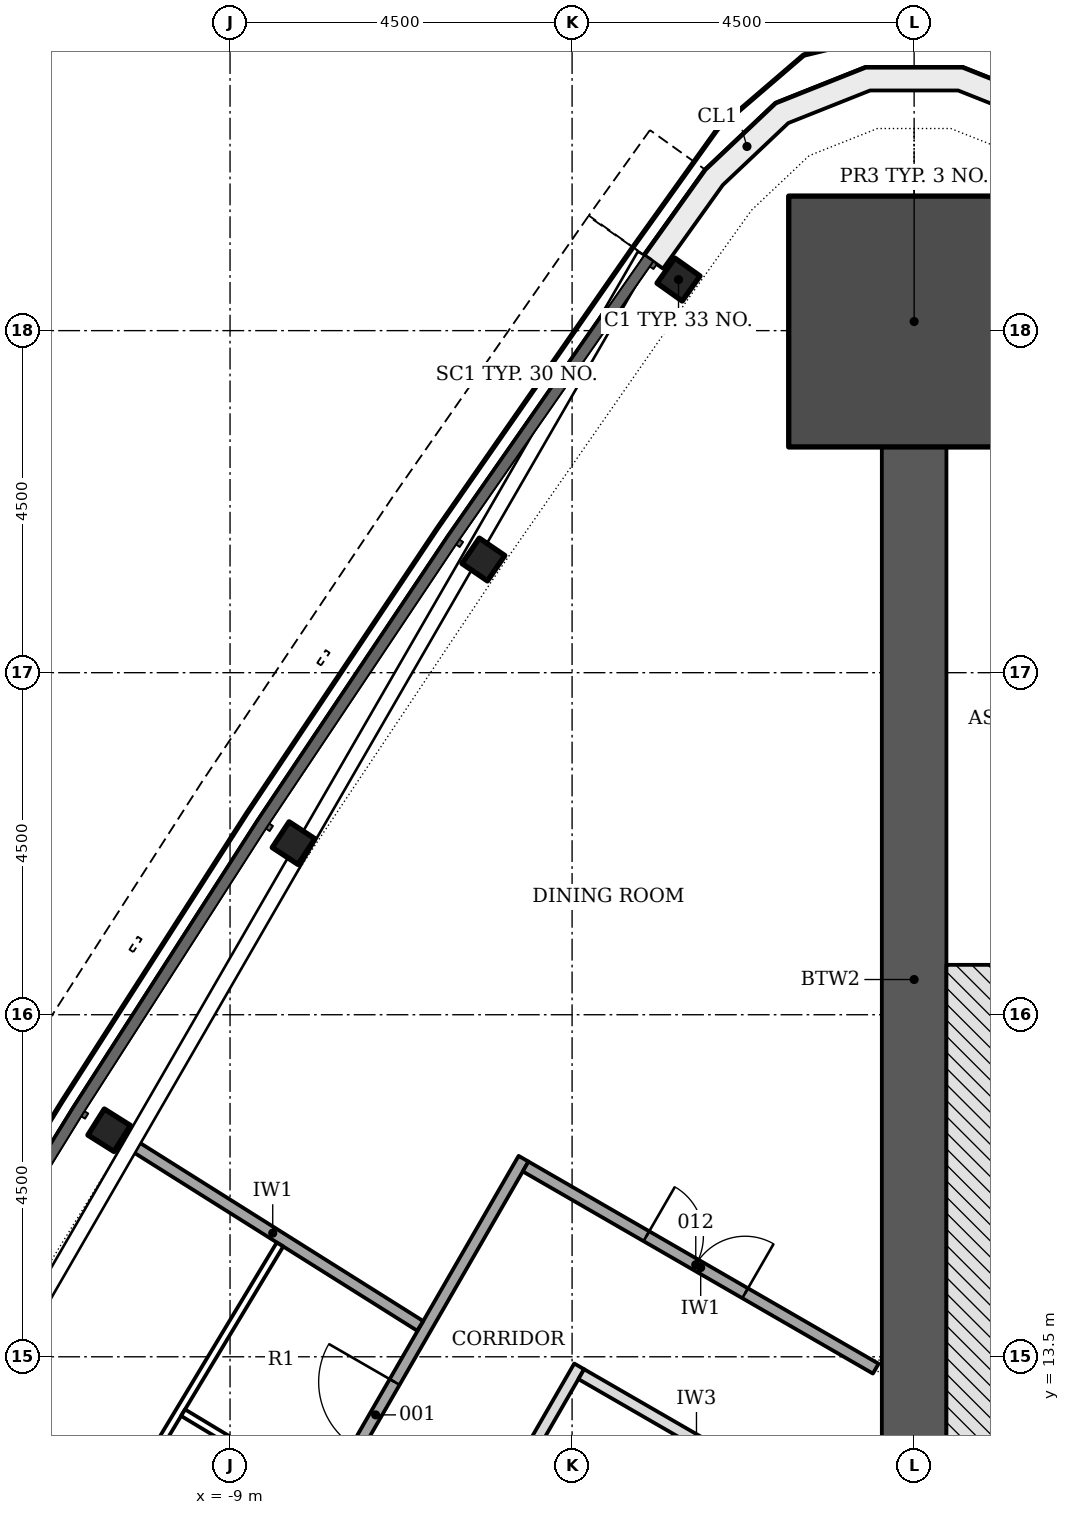
"""IFC4 building model, lengths in metres.
Left out: names, types, materials, properties, quantities, classifications, styles, units other than length and angle.
Written with IfcOpenShell. Run it as: python <this file> out.ifc"""

import sys

from ifc_helpers import new_model, si_unit, direction, frame, frame_2d, origin, origin_2d, place, context, subcontext, project, spatial, polyline, rectangle, i_section, outline, extrude, element, fill, save


model = new_model("IFC4")
c1 = context("Model", 3, precision=1e-05, world=origin(), true_north=direction((0.0, 1.0)))
c2 = subcontext(c1, "Body", "Model", "MODEL_VIEW")
j1 = project(units=[si_unit("LENGTHUNIT", "METRE"), si_unit("PLANEANGLEUNIT", "RADIAN")], contexts=[c1])
p1 = place(None, origin())
s1 = spatial("IfcSite", under=j1, at=p1, CompositionType="ELEMENT")
p2 = place(p1, origin())
s2 = spatial("IfcBuilding", under=s1, at=p2, CompositionType="ELEMENT")
p3 = place(p2, frame((0.0, 0.0, 45.6)))
s3 = spatial("IfcBuildingStorey", under=s2, at=p3, CompositionType="ELEMENT", Elevation=45.6)
p4 = place(p3, frame((0.0, 11.456, -0.2), z_axis=(0.0, 0.0, 1.0), x_axis=(0.0, 1.0, 0.0)))
e1 = element("IfcWall", 1, at=p4, inside=s3, PredefinedType="SHEAR", context=c2, shape_type="SweptSolid", body=[
    extrude(rectangle(XDim=14.014, YDim=0.85, at=frame_2d((7.007, 0.0))), origin(), (0.0, 0.0, 1.0), 3.6),
])
p5 = place(p3, frame((0.0, 27.12, -0.2), z_axis=(0.0, 0.0, 1.0), x_axis=(0.0, 1.0, 0.0)))
e2 = element("IfcColumn", 2, at=p5, inside=s3, PredefinedType="COLUMN", context=c2, shape_type="SweptSolid", body=[
    extrude(rectangle(XDim=3.3, YDim=3.3, at=origin_2d()), origin(), (0.0, 0.0, 1.0), 3.6),
])
for number, where, z_axis, x_axis in (
    (3, (-3.1, 27.672, -0.2), (0.0, 0.0, 1.0), (-0.58, -0.815, 0.0)),
    (4, (-5.667, 23.989, -0.2), (0.0, 0.0, 1.0), (-0.564, -0.826, 0.0)),
    (5, (-8.164, 20.258, -0.2), (0.0, 0.0, 1.0), (-0.548, -0.836, 0.0)),
    (6, (-10.59, 16.48, -0.2), (0.0, 0.0, 1.0), (-0.532, -0.846, 0.0)),
):
    element("IfcColumn", number, at=place(p3, frame(where, z_axis=z_axis, x_axis=x_axis)), inside=s3, PredefinedType="COLUMN", context=c2, shape_type="SweptSolid", body=[
        extrude(i_section(OverallWidth=0.404, OverallDepth=0.406, WebThickness=0.027, FlangeThickness=0.044, FilletRadius=0.015, at=origin_2d()), origin(), (0.0, 0.0, 1.0), 3.6),
    ])
p6 = place(p3, origin())
e7 = element("IfcWall", 7, at=p6, inside=s3, PredefinedType="NOTDEFINED", context=c2, shape_type="SweptSolid", body=[
    extrude(outline(polyline([(3.548, 27.99), (2.744, 29.114), (1.819, 29.989), (0.636, 30.459), (-0.636, 30.459), (-1.819, 29.989), (-2.744, 29.114), (-3.548, 27.99), (-3.304, 27.816), (-2.517, 28.916), (-1.655, 29.731), (-0.579, 30.159), (0.579, 30.159), (1.655, 29.731), (2.517, 28.916), (3.304, 27.816), (3.548, 27.99)])), origin(), (0.0, 0.0, 1.0), 3.3),
])
p7 = place(p3, frame((1.005, 11.456, -0.2), z_axis=(0.0, 0.0, 1.0), x_axis=(0.0, 1.0, 0.0)))
e8 = element("IfcWall", 8, at=p7, inside=s3, PredefinedType="SHEAR", context=c2, shape_type="SweptSolid", body=[
    extrude(rectangle(XDim=7.2, YDim=1.161, at=frame_2d((3.6, 0.0))), origin(), (0.0, 0.0, 1.0), 3.6),
])
p8 = place(p3, frame((-16.256, -3.149, 0.0), z_axis=(0.0, 0.0, 1.0), x_axis=(0.499999683919, 0.866025586274, 0.0)))
e9 = element("IfcWall", 9, at=p8, inside=s3, PredefinedType="PARTITIONING", context=c2, shape_type="SweptSolid", body=[
    extrude(rectangle(XDim=22.234, YDim=0.15, at=frame_2d((11.117, 0.0))), origin(), (0.0, 0.0, 1.0), 2.778),
])
p9 = place(p8, frame((17.842, 0.0, 0.0)))
e10 = element("IfcOpeningElement", 10, at=p9, cuts=e9, PredefinedType="OPENING", context=c2, shape_type="SweptSolid", body=[
    extrude(rectangle(XDim=1.0, YDim=2.1, at=frame_2d((0.5, 1.05))), frame((0.0, 0.085, 0.0), z_axis=(0.0, -1.0, 0.0), x_axis=(1.0, 0.0, 0.0)), (0.0, 0.0, 1.0), 0.17),
])
p10 = place(p8, frame((15.26, 0.0, 0.0)))
e11 = element("IfcOpeningElement", 11, at=p10, cuts=e9, PredefinedType="OPENING", context=c2, shape_type="SweptSolid", body=[
    extrude(rectangle(XDim=1.0, YDim=2.1, at=frame_2d((0.5, 1.05))), frame((0.0, 0.085, 0.0), z_axis=(0.0, -1.0, 0.0), x_axis=(1.0, 0.0, 0.0)), (0.0, 0.0, 1.0), 0.17),
])
p11 = place(p8, frame((11.92, 0.0, 0.0)))
e12 = element("IfcOpeningElement", 12, at=p11, cuts=e9, PredefinedType="OPENING", context=c2, shape_type="SweptSolid", body=[
    extrude(rectangle(XDim=1.5, YDim=2.1, at=frame_2d((0.75, 1.05))), frame((0.0, 0.085, 0.0), z_axis=(0.0, -1.0, 0.0), x_axis=(1.0, 0.0, 0.0)), (0.0, 0.0, 1.0), 0.17),
])
p12 = place(p8, frame((4.547, 0.0, 0.0)))
e13 = element("IfcOpeningElement", 13, at=p12, cuts=e9, PredefinedType="OPENING", context=c2, shape_type="SweptSolid", body=[
    extrude(rectangle(XDim=1.5, YDim=2.1, at=frame_2d((0.75, 1.05))), frame((0.0, 0.085, 0.0), z_axis=(0.0, -1.0, 0.0), x_axis=(1.0, 0.0, 0.0)), (0.0, 0.0, 1.0), 0.17),
])
p13 = place(p3, frame((-4.407, 13.374, 0.0), z_axis=(0.0, 0.0, 1.0), x_axis=(-0.499997181693, -0.866027030928, 0.0)))
e14 = element("IfcWall", 14, at=p13, inside=s3, PredefinedType="PARTITIONING", context=c2, shape_type="SweptSolid", body=[
    extrude(rectangle(XDim=16.77, YDim=0.15, at=frame_2d((8.385, 0.0))), origin(), (0.0, 0.0, 1.0), 2.778),
])
p14 = place(p13, frame((8.879, 0.0, 0.0)))
e15 = element("IfcOpeningElement", 15, at=p14, cuts=e14, PredefinedType="OPENING", context=c2, shape_type="SweptSolid", body=[
    extrude(rectangle(XDim=1.0, YDim=2.1, at=frame_2d((0.5, 1.05))), frame((0.0, 0.085, 0.0), z_axis=(0.0, -1.0, 0.0), x_axis=(1.0, 0.0, 0.0)), (0.0, 0.0, 1.0), 0.17),
])
p15 = place(p3, frame((-5.111, 16.003, 0.0), z_axis=(0.0, 0.0, 1.0), x_axis=(0.866034245675, -0.499984685083, 0.0)))
e16 = element("IfcWall", 16, at=p15, inside=s3, PredefinedType="PARTITIONING", context=c2, shape_type="SweptSolid", body=[
    extrude(rectangle(XDim=5.319, YDim=0.15, at=frame_2d((2.66, 0.0))), origin(), (0.0, 0.0, 1.0), 3.4),
])
p16 = place(p15, frame((1.834, 0.0, 0.0)))
e17 = element("IfcOpeningElement", 17, at=p16, cuts=e16, PredefinedType="OPENING", context=c2, shape_type="SweptSolid", body=[
    extrude(rectangle(XDim=1.5, YDim=2.1, at=frame_2d((0.75, 1.05))), frame((0.0, 0.085, 0.0), z_axis=(0.0, -1.0, 0.0), x_axis=(1.0, 0.0, 0.0)), (0.0, 0.0, 1.0), 0.17),
])
p17 = place(p3, frame((-4.379, 13.271, 0.0), z_axis=(0.0, 0.0, 1.0), x_axis=(0.866019471182, -0.500010275428, 0.0)))
e18 = element("IfcWall", 18, at=p17, inside=s3, PredefinedType="PARTITIONING", context=c2, shape_type="SweptSolid", body=[
    extrude(rectangle(XDim=3.5, YDim=0.15, at=frame_2d((1.75, 0.0))), origin(), (0.0, 0.0, 1.0), 3.4),
])
p18 = place(p3, frame((-10.378, 16.347, 0.0), z_axis=(0.0, 0.0, 1.0), x_axis=(0.846489789966, -0.532404954414, 0.0)))
e19 = element("IfcWall", 19, at=p18, inside=s3, PredefinedType="PARTITIONING", context=c2, shape_type="SweptSolid", body=[
    extrude(rectangle(XDim=4.584, YDim=0.15, at=frame_2d((2.292, 0.0))), origin(), (0.0, 0.0, 1.0), 2.778),
])
p19 = place(p3, frame((-8.343, 14.977, 0.0), z_axis=(0.0, 0.0, 1.0), x_axis=(-0.516292416674, -0.856412365911, 0.0)))
e20 = element("IfcWall", 20, at=p19, inside=s3, PredefinedType="PARTITIONING", context=c2, shape_type="SweptSolid", body=[
    extrude(rectangle(XDim=5.152, YDim=0.1, at=frame_2d((2.576, 0.0))), origin(), (0.0, 0.0, 1.0), 2.778),
])
p20 = place(p3, frame((-9.618, 12.765, 0.0), z_axis=(0.0, 0.0, 1.0), x_axis=(0.856420636577, -0.51627869726, 0.0)))
e21 = element("IfcWall", 21, at=p20, inside=s3, PredefinedType="PARTITIONING", context=c2, shape_type="SweptSolid", body=[
    extrude(rectangle(XDim=2.133, YDim=0.1, at=frame_2d((1.067, 0.0))), origin(), (0.0, 0.0, 1.0), 3.4),
])
p21 = place(p9, origin())
e22 = element("IfcDoor", 22, at=p21, inside=s3, OperationType="SINGLE_SWING_RIGHT", PredefinedType="DOOR", context=c2, shape_type="SweptSolid", body=[
    extrude(rectangle(XDim=1.0, YDim=2.1, at=frame_2d((0.5, 1.05))), frame((0.0, 0.025, 0.0), z_axis=(0.0, -1.0, 0.0), x_axis=(1.0, 0.0, 0.0)), (0.0, 0.0, 1.0), 0.05),
])
fill(e10, e22)
p22 = place(p16, origin())
e23 = element("IfcDoor", 23, at=p22, inside=s3, OperationType="DOUBLE_DOOR_SINGLE_SWING", PredefinedType="DOOR", context=c2, shape_type="SweptSolid", body=[
    extrude(rectangle(XDim=1.5, YDim=2.1, at=frame_2d((0.75, 1.05))), frame((0.0, 0.025, 0.0), z_axis=(0.0, -1.0, 0.0), x_axis=(1.0, 0.0, 0.0)), (0.0, 0.0, 1.0), 0.05),
])
fill(e17, e23)
save(model, sys.argv[1])
